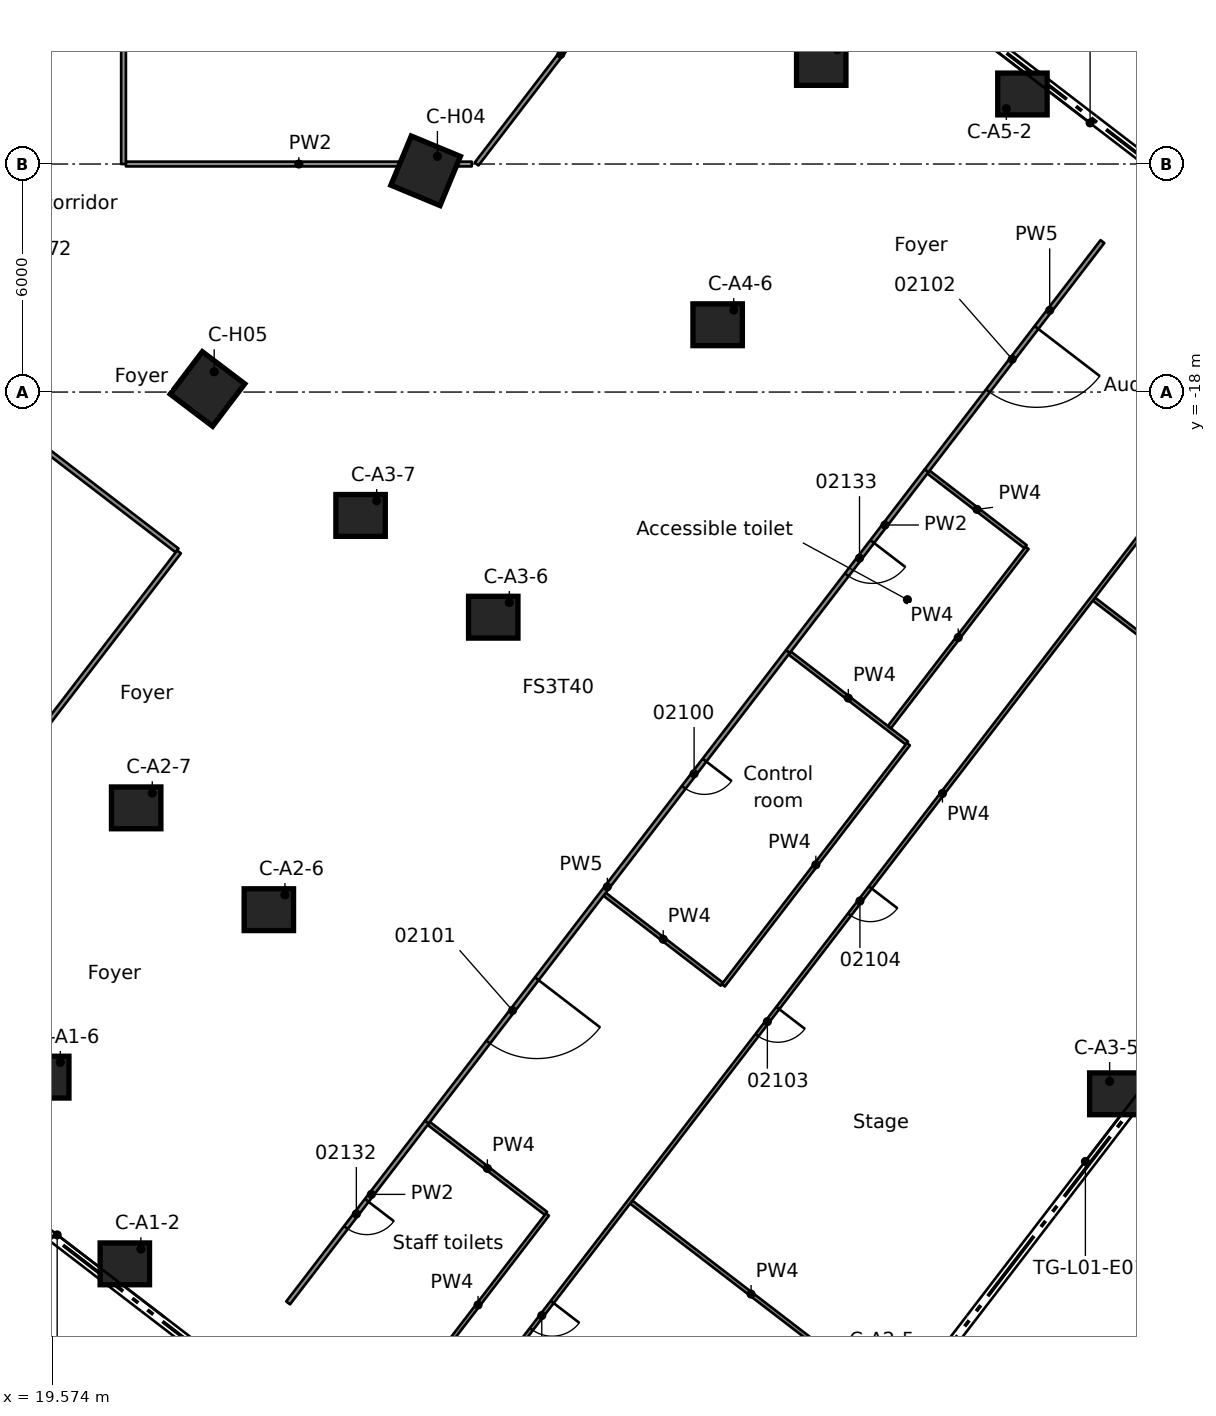
"""IFC4 building model, lengths in metres.
Left out: names, types, materials, properties, quantities, classifications, styles, units other than length and angle.
Written with IfcOpenShell. Run it as: python <this file> out.ifc"""

import sys

from ifc_helpers import new_model, si_unit, direction, frame, frame_2d, origin, origin_2d, place, context, subcontext, project, spatial, rectangle, extrude, element, fill, save


model = new_model("IFC4")
c1 = context("Model", 3, precision=1e-05, world=origin(), true_north=direction((0.0, 1.0)))
c2 = subcontext(c1, "Body", "Model", "MODEL_VIEW")
j1 = project(units=[si_unit("LENGTHUNIT", "METRE"), si_unit("PLANEANGLEUNIT", "RADIAN")], contexts=[c1])
p1 = place(None, origin())
s1 = spatial("IfcSite", under=j1, at=p1, CompositionType="ELEMENT")
p2 = place(p1, origin())
s2 = spatial("IfcBuilding", under=s1, at=p2, CompositionType="ELEMENT")
p3 = place(p2, frame((0.0, 0.0, 10.5)))
s3 = spatial("IfcBuildingStorey", under=s2, at=p3, CompositionType="ELEMENT", Elevation=10.5)
for number, where, z_axis, x_axis in (
    (1, (21.484, -40.939, -1.0), (0.0, 0.0, 1.0), (0.707, 0.707, 0.0)),
    (2, (19.364, -36.026, -1.0), (0.0, 0.0, 1.0), (0.707, 0.707, 0.0)),
):
    element("IfcColumn", number, at=place(p3, frame(where, z_axis=z_axis, x_axis=x_axis)), inside=s3, PredefinedType="COLUMN", context=c2, shape_type="SweptSolid", body=[
        extrude(rectangle(XDim=3.4, YDim=3.4, at=origin_2d()), origin(), (0.0, 0.0, 1.0), 1.0),
    ])
p4 = place(p3, frame((27.389, -33.243, -1.0), z_axis=(0.0, 0.0, 1.0), x_axis=(0.707106781187, 0.707106781187, 0.0)))
e3 = element("IfcColumn", 3, at=p4, inside=s3, PredefinedType="COLUMN", context=c2, shape_type="SweptSolid", body=[
    extrude(rectangle(XDim=2.55, YDim=2.55, at=origin_2d()), origin(), (0.0, 0.0, 1.0), 1.0),
])
for number, where, z_axis, x_axis in (
    (4, (34.503, -38.702, -1.0), (0.0, 0.0, 1.0), (0.707, 0.707, 0.0)),
    (5, (41.617, -44.16, -1.0), (0.0, 0.0, 1.0), (0.707, 0.707, 0.0)),
):
    element("IfcColumn", number, at=place(p3, frame(where, z_axis=z_axis, x_axis=x_axis)), inside=s3, PredefinedType="COLUMN", context=c2, shape_type="SweptSolid", body=[
        extrude(rectangle(XDim=3.4, YDim=3.4, at=origin_2d()), origin(), (0.0, 0.0, 1.0), 1.0),
    ])
p5 = place(p3, frame((25.274, -31.62, -1.0), z_axis=(0.0, 0.0, 1.0), x_axis=(0.707106781187, 0.707106781187, 0.0)))
e6 = element("IfcColumn", 6, at=p5, inside=s3, PredefinedType="COLUMN", context=c2, shape_type="SweptSolid", body=[
    extrude(rectangle(XDim=2.55, YDim=2.55, at=origin_2d()), origin(), (0.0, 0.0, 1.0), 1.0),
])
p6 = place(p3, frame((21.783, -28.941, -1.0), z_axis=(0.0, 0.0, 1.0), x_axis=(0.707106781187, 0.707106781187, 0.0)))
e7 = element("IfcColumn", 7, at=p6, inside=s3, PredefinedType="COLUMN", context=c2, shape_type="SweptSolid", body=[
    extrude(rectangle(XDim=3.4, YDim=3.4, at=origin_2d()), origin(), (0.0, 0.0, 1.0), 1.0),
])
p7 = place(p3, frame((33.294, -25.548, -1.0), z_axis=(0.0, 0.0, 1.0), x_axis=(0.707106781187, 0.707106781187, 0.0)))
e8 = element("IfcColumn", 8, at=p7, inside=s3, PredefinedType="COLUMN", context=c2, shape_type="SweptSolid", body=[
    extrude(rectangle(XDim=2.55, YDim=2.55, at=origin_2d()), origin(), (0.0, 0.0, 1.0), 1.0),
])
for number, where, z_axis, x_axis in (
    (9, (40.408, -31.006, -1.0), (0.0, 0.0, 1.0), (0.707, 0.707, 0.0)),
    (10, (47.522, -36.465, -1.0), (0.0, 0.0, 1.0), (0.707, 0.707, 0.0)),
):
    element("IfcColumn", number, at=place(p3, frame(where, z_axis=z_axis, x_axis=x_axis)), inside=s3, PredefinedType="COLUMN", context=c2, shape_type="SweptSolid", body=[
        extrude(rectangle(XDim=3.4, YDim=3.4, at=origin_2d()), origin(), (0.0, 0.0, 1.0), 1.0),
    ])
p8 = place(p3, frame((31.179, -23.924, -1.0), z_axis=(0.0, 0.0, 1.0), x_axis=(0.707106781187, 0.707106781187, 0.0)))
e11 = element("IfcColumn", 11, at=p8, inside=s3, PredefinedType="COLUMN", context=c2, shape_type="SweptSolid", body=[
    extrude(rectangle(XDim=2.55, YDim=2.55, at=origin_2d()), origin(), (0.0, 0.0, 1.0), 1.0),
])
p9 = place(p3, frame((27.688, -21.246, -1.0), z_axis=(0.0, 0.0, 1.0), x_axis=(0.707106781187, 0.707106781187, 0.0)))
e12 = element("IfcColumn", 12, at=p9, inside=s3, PredefinedType="COLUMN", context=c2, shape_type="SweptSolid", body=[
    extrude(rectangle(XDim=3.4, YDim=3.4, at=origin_2d()), origin(), (0.0, 0.0, 1.0), 1.0),
])
p10 = place(p3, frame((39.199, -17.852, -1.0), z_axis=(0.0, 0.0, 1.0), x_axis=(0.707106781187, 0.707106781187, 0.0)))
e13 = element("IfcColumn", 13, at=p10, inside=s3, PredefinedType="COLUMN", context=c2, shape_type="SweptSolid", body=[
    extrude(rectangle(XDim=2.55, YDim=2.55, at=origin_2d()), origin(), (0.0, 0.0, 1.0), 1.0),
])
p11 = place(p3, frame((46.313, -23.311, -1.0), z_axis=(0.0, 0.0, 1.0), x_axis=(0.707106781187, 0.707106781187, 0.0)))
e14 = element("IfcColumn", 14, at=p11, inside=s3, PredefinedType="COLUMN", context=c2, shape_type="SweptSolid", body=[
    extrude(rectangle(XDim=3.4, YDim=3.4, at=origin_2d()), origin(), (0.0, 0.0, 1.0), 1.0),
])
p12 = place(p3, frame((37.084, -16.229, -1.0), z_axis=(0.0, 0.0, 1.0), x_axis=(0.707106781187, 0.707106781187, 0.0)))
e15 = element("IfcColumn", 15, at=p12, inside=s3, PredefinedType="COLUMN", context=c2, shape_type="SweptSolid", body=[
    extrude(rectangle(XDim=2.55, YDim=2.55, at=origin_2d()), origin(), (0.0, 0.0, 1.0), 1.0),
])
for number, where, z_axis, x_axis in (
    (16, (45.104, -10.157, -1.0), (0.0, 0.0, 1.0), (0.707, 0.707, 0.0)),
    (17, (39.81, -9.38, -1.0), (0.0, 0.0, 1.0), (0.707, 0.707, 0.0)),
    (18, (29.4, -12.178, -1.0), (0.0, 0.0, 1.0), (0.707, 0.707, 0.0)),
    (19, (23.659, -17.919, -1.0), (0.0, 0.0, 1.0), (0.707, 0.707, 0.0)),
    (20, (17.919, -23.659, -1.0), (0.0, 0.0, 1.0), (0.707, 0.707, 0.0)),
):
    element("IfcColumn", number, at=place(p3, frame(where, z_axis=z_axis, x_axis=x_axis)), inside=s3, PredefinedType="COLUMN", context=c2, shape_type="SweptSolid", body=[
        extrude(rectangle(XDim=3.4, YDim=3.4, at=origin_2d()), origin(), (0.0, 0.0, 1.0), 1.0),
    ])
for number, where, z_axis, x_axis in (
    (21, (21.484, -40.939, 0.0), (0.0, 0.0, 1.0), (1.0, 0.0, 0.0)),
    (22, (19.364, -36.026, 0.0), (0.0, 0.0, 1.0), (1.0, 0.0, 0.0)),
    (23, (25.274, -31.62, 0.0), (0.0, 0.0, 1.0), (1.0, 0.0, 0.0)),
    (24, (21.783, -28.941, 0.0), (0.0, 0.0, 1.0), (1.0, 0.0, 0.0)),
    (25, (47.522, -36.465, 0.0), (0.0, 0.0, 1.0), (1.0, 0.0, 0.0)),
    (26, (31.179, -23.924, 0.0), (0.0, 0.0, 1.0), (1.0, 0.0, 0.0)),
    (27, (27.688, -21.246, 0.0), (0.0, 0.0, 1.0), (1.0, 0.0, 0.0)),
    (28, (37.084, -16.229, 0.0), (0.0, 0.0, 1.0), (1.0, 0.0, 0.0)),
    (29, (45.104, -10.157, 0.0), (0.0, 0.0, 1.0), (1.0, 0.0, 0.0)),
    (30, (39.81, -9.38, 0.0), (0.0, 0.0, 1.0), (1.0, 0.0, 0.0)),
):
    element("IfcColumn", number, at=place(p3, frame(where, z_axis=z_axis, x_axis=x_axis)), inside=s3, PredefinedType="COLUMN", context=c2, shape_type="SweptSolid", body=[
        extrude(rectangle(XDim=1.3, YDim=1.1, at=origin_2d()), origin(), (0.0, 0.0, 1.0), 5.0),
    ])
for number, where, z_axis, x_axis in (
    (31, (29.4, -12.178, 0.0), (0.0, 0.0, 1.0), (0.924, -0.383, 0.0)),
    (32, (23.659, -17.919, 0.0), (0.0, 0.0, 1.0), (0.797, -0.604, 0.0)),
):
    element("IfcColumn", number, at=place(p3, frame(where, z_axis=z_axis, x_axis=x_axis)), inside=s3, PredefinedType="COLUMN", context=c2, shape_type="SweptSolid", body=[
        extrude(rectangle(XDim=1.4, YDim=1.4, at=origin_2d()), origin(), (0.0, 0.0, 1.0), 5.0),
    ])
p13 = place(p3, frame((29.483, -37.245, 0.0), z_axis=(0.0, 0.0, 1.0), x_axis=(0.793345324298, -0.608771875513, 0.0)))
e33 = element("IfcWall", 33, at=p13, inside=s3, PredefinedType="PARTITIONING", context=c2, shape_type="SweptSolid", body=[
    extrude(rectangle(XDim=3.885, YDim=0.1, at=frame_2d((1.942, 0.0))), origin(), (0.0, 0.0, 1.0), 9.6),
])
p14 = place(p3, frame((34.81, -39.315, 0.0), z_axis=(0.0, 0.0, 1.0), x_axis=(0.793314155102, -0.608812492738, 0.0)))
e34 = element("IfcWall", 34, at=p14, inside=s3, PredefinedType="PARTITIONING", context=c2, shape_type="SweptSolid", body=[
    extrude(rectangle(XDim=7.95, YDim=0.1, at=frame_2d((3.975, 0.0))), origin(), (0.0, 0.0, 1.0), 9.6),
])
p15 = place(p3, frame((34.11, -31.215, 0.0), z_axis=(0.0, 0.0, 1.0), x_axis=(0.793317087908, -0.608808671121, 0.0)))
e35 = element("IfcWall", 35, at=p15, inside=s3, PredefinedType="PARTITIONING", context=c2, shape_type="SweptSolid", body=[
    extrude(rectangle(XDim=3.886, YDim=0.1, at=frame_2d((1.943, 0.0))), origin(), (0.0, 0.0, 1.0), 9.6),
])
p16 = place(p3, frame((22.86, -22.168, 0.0), z_axis=(0.0, 0.0, 1.0), x_axis=(-0.793328204451, 0.608794185274, 0.0)))
e36 = element("IfcWall", 36, at=p16, inside=s3, PredefinedType="PARTITIONING", context=c2, shape_type="SweptSolid", body=[
    extrude(rectangle(XDim=12.492, YDim=0.125, at=frame_2d((6.246, 0.0))), origin(), (0.0, 0.0, 1.0), 4.58),
])
p17 = place(p16, frame((5.788, 0.0, 0.0)))
e37 = element("IfcOpeningElement", 37, at=p17, cuts=e36, PredefinedType="OPENING", context=c2, shape_type="SweptSolid", body=[
    extrude(rectangle(XDim=0.9, YDim=2.1, at=frame_2d((0.45, 1.05))), frame((0.0, 0.073, 0.0), z_axis=(0.0, -1.0, 0.0), x_axis=(1.0, 0.0, 0.0)), (0.0, 0.0, 1.0), 0.145),
])
p18 = place(p3, frame((38.98, -24.868, 0.0), z_axis=(0.0, 0.0, 1.0), x_axis=(0.793317087908, -0.608808671121, 0.0)))
e38 = element("IfcWall", 38, at=p18, inside=s3, PredefinedType="PARTITIONING", context=c2, shape_type="SweptSolid", body=[
    extrude(rectangle(XDim=3.886, YDim=0.1, at=frame_2d((1.943, 0.0))), origin(), (0.0, 0.0, 1.0), 9.6),
])
p19 = place(p3, frame((42.633, -20.108, 0.0), z_axis=(0.0, 0.0, 1.0), x_axis=(0.793055311334, -0.609149631178, 0.0)))
e39 = element("IfcWall", 39, at=p19, inside=s3, PredefinedType="PARTITIONING", context=c2, shape_type="SweptSolid", body=[
    extrude(rectangle(XDim=3.218, YDim=0.1, at=frame_2d((1.609, 0.0))), origin(), (0.0, 0.0, 1.0), 9.6),
])
p20 = place(p3, frame((46.985, -23.448, 0.0), z_axis=(0.0, 0.0, 1.0), x_axis=(0.793314155102, -0.608812492738, 0.0)))
e40 = element("IfcWall", 40, at=p20, inside=s3, PredefinedType="PARTITIONING", context=c2, shape_type="SweptSolid", body=[
    extrude(rectangle(XDim=7.95, YDim=0.1, at=frame_2d((3.975, 0.0))), origin(), (0.0, 0.0, 1.0), 9.6),
])
p21 = place(p3, frame((21.512, -12.0, 0.0), z_axis=(0.0, 0.0, 1.0), x_axis=(1.0, 0.0, 0.0)))
e41 = element("IfcWall", 41, at=p21, inside=s3, PredefinedType="PARTITIONING", context=c2, shape_type="SweptSolid", body=[
    extrude(rectangle(XDim=9.102, YDim=0.125, at=frame_2d((4.551, 0.0))), origin(), (0.0, 0.0, 1.0), 4.58),
])
p22 = place(p3, frame((51.571, -17.393, 0.0), z_axis=(0.0, 0.0, 1.0), x_axis=(-0.608824368929, -0.793305040825, 0.0)))
e42 = element("IfcWall", 42, at=p22, inside=s3, PredefinedType="PARTITIONING", context=c2, shape_type="SweptSolid", body=[
    extrude(rectangle(XDim=35.196, YDim=0.1, at=frame_2d((17.598, 0.0))), origin(), (0.0, 0.0, 1.0), 9.6),
])
p23 = place(p22, frame((21.197, 0.0, 0.0)))
e43 = element("IfcOpeningElement", 43, at=p23, cuts=e42, PredefinedType="OPENING", context=c2, shape_type="SweptSolid", body=[
    extrude(rectangle(XDim=0.9, YDim=2.1, at=frame_2d((0.45, 1.05))), frame((0.0, 0.06, 0.0), z_axis=(0.0, -1.0, 0.0), x_axis=(1.0, 0.0, 0.0)), (0.0, 0.0, 1.0), 0.12),
])
p24 = place(p22, frame((17.197, 0.0, 0.0)))
e44 = element("IfcOpeningElement", 44, at=p24, cuts=e42, PredefinedType="OPENING", context=c2, shape_type="SweptSolid", body=[
    extrude(rectangle(XDim=0.9, YDim=2.1, at=frame_2d((0.45, 1.05))), frame((0.0, 0.06, 0.0), z_axis=(0.0, -1.0, 0.0), x_axis=(1.0, 0.0, 0.0)), (0.0, 0.0, 1.0), 0.12),
])
p25 = place(p22, frame((30.946, 0.0, 0.0)))
e45 = element("IfcOpeningElement", 45, at=p25, cuts=e42, PredefinedType="OPENING", context=c2, shape_type="SweptSolid", body=[
    extrude(rectangle(XDim=0.9, YDim=2.1, at=frame_2d((0.45, 1.05))), frame((0.0, 0.06, 0.0), z_axis=(0.0, -1.0, 0.0), x_axis=(1.0, 0.0, 0.0)), (0.0, 0.0, 1.0), 0.12),
])
p26 = place(p22, frame((3.346, 0.0, 0.0)))
e46 = element("IfcOpeningElement", 46, at=p26, cuts=e42, PredefinedType="OPENING", context=c2, shape_type="SweptSolid", body=[
    extrude(rectangle(XDim=0.9, YDim=2.1, at=frame_2d((0.45, 1.05))), frame((0.0, 0.06, 0.0), z_axis=(0.0, -1.0, 0.0), x_axis=(1.0, 0.0, 0.0)), (0.0, 0.0, 1.0), 0.12),
])
p27 = place(p3, frame((28.953, -44.401, 0.0), z_axis=(0.0, 0.0, 1.0), x_axis=(0.608740760069, 0.793369199699, 0.0)))
e47 = element("IfcWall", 47, at=p27, inside=s3, PredefinedType="PARTITIONING", context=c2, shape_type="SweptSolid", body=[
    extrude(rectangle(XDim=6.0, YDim=0.1, at=frame_2d((3.0, 0.0))), origin(), (0.0, 0.0, 1.0), 9.6),
])
p28 = place(p3, frame((37.233, -33.611, 0.0), z_axis=(0.0, 0.0, 1.0), x_axis=(0.608801811287, 0.793322352246, 0.0)))
e48 = element("IfcWall", 48, at=p28, inside=s3, PredefinedType="PARTITIONING", context=c2, shape_type="SweptSolid", body=[
    extrude(rectangle(XDim=8.0, YDim=0.1, at=frame_2d((4.0, 0.0))), origin(), (0.0, 0.0, 1.0), 9.6),
])
p29 = place(p3, frame((41.603, -26.818, 0.0), z_axis=(0.0, 0.0, 1.0), x_axis=(0.608976730192, 0.793188087458, 0.0)))
e49 = element("IfcWall", 49, at=p29, inside=s3, PredefinedType="PARTITIONING", context=c2, shape_type="SweptSolid", body=[
    extrude(rectangle(XDim=5.949, YDim=0.1, at=frame_2d((2.975, 0.0))), origin(), (0.0, 0.0, 1.0), 9.6),
])
p30 = place(p3, frame((29.433, -37.207, 0.0), z_axis=(0.0, 0.0, 1.0), x_axis=(-0.608721107123, -0.793384278734, 0.0)))
e50 = element("IfcWall", 50, at=p30, inside=s3, PredefinedType="PARTITIONING", context=c2, shape_type="SweptSolid", body=[
    extrude(rectangle(XDim=6.0, YDim=0.125, at=frame_2d((3.0, 0.0))), origin(), (0.0, 0.0, 1.0), 4.58),
])
p31 = place(p30, frame((2.6, 0.0, 0.0)))
e51 = element("IfcOpeningElement", 51, at=p31, cuts=e50, PredefinedType="OPENING", context=c2, shape_type="SweptSolid", body=[
    extrude(rectangle(XDim=0.9, YDim=2.1, at=frame_2d((0.45, 1.05))), frame((0.0, 0.073, 0.0), z_axis=(0.0, -1.0, 0.0), x_axis=(1.0, 0.0, 0.0)), (0.0, 0.0, 1.0), 0.145),
])
p32 = place(p3, frame((42.582, -20.07, 0.0), z_axis=(0.0, 0.0, 1.0), x_axis=(-0.608721107123, -0.793384278734, 0.0)))
e52 = element("IfcWall", 52, at=p32, inside=s3, PredefinedType="PARTITIONING", context=c2, shape_type="SweptSolid", body=[
    extrude(rectangle(XDim=6.0, YDim=0.125, at=frame_2d((3.0, 0.0))), origin(), (0.0, 0.0, 1.0), 4.58),
])
p33 = place(p32, frame((2.35, 0.0, 0.0)))
e53 = element("IfcOpeningElement", 53, at=p33, cuts=e52, PredefinedType="OPENING", context=c2, shape_type="SweptSolid", body=[
    extrude(rectangle(XDim=1.1, YDim=2.1, at=frame_2d((0.55, 1.05))), frame((0.0, 0.073, 0.0), z_axis=(0.0, -1.0, 0.0), x_axis=(1.0, 0.0, 0.0)), (0.0, 0.0, 1.0), 0.145),
])
p34 = place(p3, frame((38.929, -24.831, 0.0), z_axis=(0.0, 0.0, 1.0), x_axis=(-0.608738381153, -0.793371025001, 0.0)))
e54 = element("IfcWall", 54, at=p34, inside=s3, PredefinedType="PARTITIONING", context=c2, shape_type="SweptSolid", body=[
    extrude(rectangle(XDim=15.599, YDim=0.125, at=frame_2d((7.8, 0.0))), origin(), (0.0, 0.0, 1.0), 9.6),
])
p35 = place(p34, frame((3.599, 0.0, 0.0)))
e55 = element("IfcOpeningElement", 55, at=p35, cuts=e54, PredefinedType="OPENING", context=c2, shape_type="SweptSolid", body=[
    extrude(rectangle(XDim=0.9, YDim=2.1, at=frame_2d((0.45, 1.05))), frame((0.0, 0.073, 0.0), z_axis=(0.0, -1.0, 0.0), x_axis=(1.0, 0.0, 0.0)), (0.0, 0.0, 1.0), 0.145),
])
p36 = place(p34, frame((10.849, 0.0, 0.0)))
e56 = element("IfcOpeningElement", 56, at=p36, cuts=e54, PredefinedType="OPENING", context=c2, shape_type="SweptSolid", body=[
    extrude(rectangle(XDim=2.1, YDim=2.1, at=frame_2d((1.05, 1.05))), frame((0.0, 0.073, 0.0), z_axis=(0.0, -1.0, 0.0), x_axis=(1.0, 0.0, 0.0)), (0.0, 0.0, 1.0), 0.145),
])
p37 = place(p3, frame((47.209, -14.041, 0.0), z_axis=(0.0, 0.0, 1.0), x_axis=(-0.608738377563, -0.793371027756, 0.0)))
e57 = element("IfcWall", 57, at=p37, inside=s3, PredefinedType="PARTITIONING", context=c2, shape_type="SweptSolid", body=[
    extrude(rectangle(XDim=7.599, YDim=0.125, at=frame_2d((3.8, 0.0))), origin(), (0.0, 0.0, 1.0), 9.6),
])
p38 = place(p37, frame((2.85, 0.0, 0.0)))
e58 = element("IfcOpeningElement", 58, at=p38, cuts=e57, PredefinedType="OPENING", context=c2, shape_type="SweptSolid", body=[
    extrude(rectangle(XDim=2.1, YDim=2.1, at=frame_2d((1.05, 1.05))), frame((0.0, 0.073, 0.0), z_axis=(0.0, -1.0, 0.0), x_axis=(1.0, 0.0, 0.0)), (0.0, 0.0, 1.0), 0.145),
])
p39 = place(p3, frame((15.078, -32.412, 0.0), z_axis=(0.0, 0.0, 1.0), x_axis=(0.608793231938, 0.793328936033, 0.0)))
e59 = element("IfcWall", 59, at=p39, inside=s3, PredefinedType="PARTITIONING", context=c2, shape_type="SweptSolid", body=[
    extrude(rectangle(XDim=12.865, YDim=0.125, at=frame_2d((6.432, 0.0))), origin(), (0.0, 0.0, 1.0), 4.58),
])
p40 = place(p3, frame((30.741, -12.0, 0.0), z_axis=(0.0, 0.0, 1.0), x_axis=(0.608773631009, 0.793343977218, 0.0)))
e60 = element("IfcWall", 60, at=p40, inside=s3, PredefinedType="PARTITIONING", context=c2, shape_type="SweptSolid", body=[
    extrude(rectangle(XDim=7.281, YDim=0.125, at=frame_2d((3.64, 0.0))), origin(), (0.0, 0.0, 1.0), 4.58),
])
p41 = place(p3, frame((21.45, 14.451, 0.0), z_axis=(0.0, 0.0, 1.0), x_axis=(0.0, -1.0, 0.0)))
e61 = element("IfcWall", 61, at=p41, inside=s3, PredefinedType="PARTITIONING", context=c2, shape_type="SweptSolid", body=[
    extrude(rectangle(XDim=26.451, YDim=0.125, at=frame_2d((13.226, 0.0))), origin(), (0.0, 0.0, 1.0), 4.58),
])
p42 = place(p41, frame((20.051, 0.0, 0.0)))
e62 = element("IfcOpeningElement", 62, at=p42, cuts=e61, PredefinedType="OPENING", context=c2, shape_type="SweptSolid", body=[
    extrude(rectangle(XDim=0.9, YDim=2.1, at=frame_2d((0.45, 1.05))), frame((0.0, 0.073, 0.0), z_axis=(0.0, -1.0, 0.0), x_axis=(1.0, 0.0, 0.0)), (0.0, 0.0, 1.0), 0.145),
])
p43 = place(p41, frame((7.801, 0.0, 0.0)))
e63 = element("IfcOpeningElement", 63, at=p43, cuts=e61, PredefinedType="OPENING", context=c2, shape_type="SweptSolid", body=[
    extrude(rectangle(XDim=1.1, YDim=2.1, at=frame_2d((0.55, 1.05))), frame((0.0, 0.073, 0.0), z_axis=(0.0, -1.0, 0.0), x_axis=(1.0, 0.0, 0.0)), (0.0, 0.0, 1.0), 0.145),
])
p44 = place(p35, origin())
e64 = element("IfcDoor", 64, at=p44, inside=s3, OperationType="SINGLE_SWING_LEFT", PredefinedType="DOOR", context=c2, shape_type="SweptSolid", body=[
    extrude(rectangle(XDim=0.9, YDim=2.1, at=frame_2d((0.45, 1.05))), frame((0.0, 0.025, 0.0), z_axis=(0.0, -1.0, 0.0), x_axis=(1.0, 0.0, 0.0)), (0.0, 0.0, 1.0), 0.05),
])
fill(e55, e64)
p45 = place(p36, origin())
e65 = element("IfcDoor", 65, at=p45, inside=s3, OperationType="DOUBLE_DOOR_SINGLE_SWING", PredefinedType="DOOR", context=c2, shape_type="SweptSolid", body=[
    extrude(rectangle(XDim=2.1, YDim=2.1, at=frame_2d((1.05, 1.05))), frame((0.0, 0.025, 0.0), z_axis=(0.0, -1.0, 0.0), x_axis=(1.0, 0.0, 0.0)), (0.0, 0.0, 1.0), 0.05),
])
fill(e56, e65)
p46 = place(p38, origin())
e66 = element("IfcDoor", 66, at=p46, inside=s3, OperationType="DOUBLE_DOOR_SINGLE_SWING", PredefinedType="DOOR", context=c2, shape_type="SweptSolid", body=[
    extrude(rectangle(XDim=2.1, YDim=2.1, at=frame_2d((1.05, 1.05))), frame((0.0, 0.025, 0.0), z_axis=(0.0, -1.0, 0.0), x_axis=(1.0, 0.0, 0.0)), (0.0, 0.0, 1.0), 0.05),
])
fill(e58, e66)
p47 = place(p23, origin())
e67 = element("IfcDoor", 67, at=p47, inside=s3, OperationType="SINGLE_SWING_RIGHT", PredefinedType="DOOR", context=c2, shape_type="SweptSolid", body=[
    extrude(rectangle(XDim=0.9, YDim=2.1, at=frame_2d((0.45, 1.05))), frame((0.0, 0.025, 0.0), z_axis=(0.0, -1.0, 0.0), x_axis=(1.0, 0.0, 0.0)), (0.0, 0.0, 1.0), 0.05),
])
fill(e43, e67)
p48 = place(p24, origin())
e68 = element("IfcDoor", 68, at=p48, inside=s3, OperationType="SINGLE_SWING_RIGHT", PredefinedType="DOOR", context=c2, shape_type="SweptSolid", body=[
    extrude(rectangle(XDim=0.9, YDim=2.1, at=frame_2d((0.45, 1.05))), frame((0.0, 0.025, 0.0), z_axis=(0.0, -1.0, 0.0), x_axis=(1.0, 0.0, 0.0)), (0.0, 0.0, 1.0), 0.05),
])
fill(e44, e68)
p49 = place(p25, origin())
e69 = element("IfcDoor", 69, at=p49, inside=s3, OperationType="SINGLE_SWING_RIGHT", PredefinedType="DOOR", context=c2, shape_type="SweptSolid", body=[
    extrude(rectangle(XDim=0.9, YDim=2.1, at=frame_2d((0.45, 1.05))), frame((0.0, 0.025, 0.0), z_axis=(0.0, -1.0, 0.0), x_axis=(1.0, 0.0, 0.0)), (0.0, 0.0, 1.0), 0.05),
])
fill(e45, e69)
p50 = place(p31, origin())
e70 = element("IfcDoor", 70, at=p50, inside=s3, OperationType="SINGLE_SWING_RIGHT", PredefinedType="DOOR", context=c2, shape_type="SweptSolid", body=[
    extrude(rectangle(XDim=0.9, YDim=2.1, at=frame_2d((0.45, 1.05))), frame((0.0, 0.025, 0.0), z_axis=(0.0, -1.0, 0.0), x_axis=(1.0, 0.0, 0.0)), (0.0, 0.0, 1.0), 0.05),
])
fill(e51, e70)
p51 = place(p33, origin())
e71 = element("IfcDoor", 71, at=p51, inside=s3, OperationType="SINGLE_SWING_LEFT", PredefinedType="DOOR", context=c2, shape_type="SweptSolid", body=[
    extrude(rectangle(XDim=1.1, YDim=2.1, at=frame_2d((0.55, 1.05))), frame((0.0, 0.025, 0.0), z_axis=(0.0, -1.0, 0.0), x_axis=(1.0, 0.0, 0.0)), (0.0, 0.0, 1.0), 0.05),
])
fill(e53, e71)
save(model, sys.argv[1])
